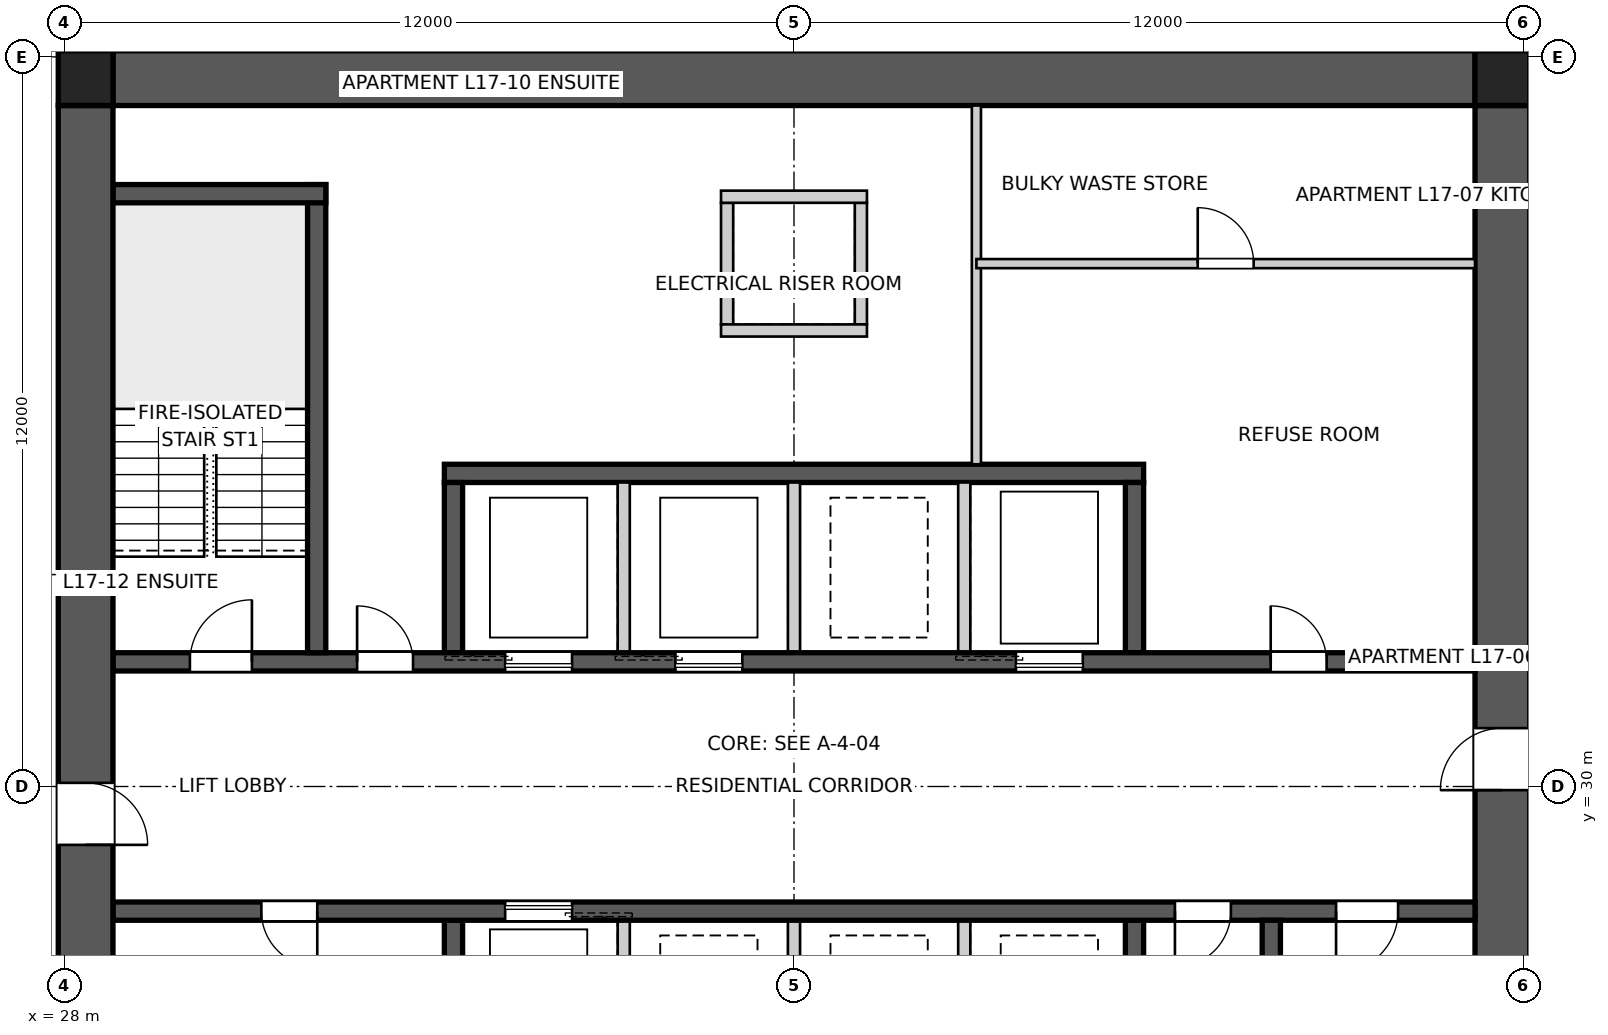
"""IFC4 building model, lengths in metres.
Left out: names, types, materials, properties, quantities, classifications, styles, units other than length and angle.
Written with IfcOpenShell. Run it as: python <this file> out.ifc"""

import sys

from ifc_helpers import new_model, si_unit, direction, frame, frame_2d, origin, origin_2d, place, context, subcontext, project, spatial, polyline, rectangle, outline, extrude, element, fill, save


model = new_model("IFC4")
c1 = context("Model", 3, precision=1e-05, world=origin(), true_north=direction((0.0, 1.0)))
c2 = subcontext(c1, "Body", "Model", "MODEL_VIEW")
j1 = project(units=[si_unit("LENGTHUNIT", "METRE"), si_unit("PLANEANGLEUNIT", "RADIAN")], contexts=[c1])
p1 = place(None, origin())
s1 = spatial("IfcSite", under=j1, at=p1, CompositionType="ELEMENT")
p2 = place(p1, origin())
s2 = spatial("IfcBuilding", under=s1, at=p2, CompositionType="ELEMENT")
p3 = place(p2, frame((0.0, 0.0, 64.2)))
s3 = spatial("IfcBuildingStorey", under=s2, at=p3, CompositionType="ELEMENT", Elevation=64.2)
p4 = place(p3, frame((28.8, 41.65, 0.0), z_axis=(0.0, 0.0, 1.0), x_axis=(1.0, 0.0, 0.0)))
e1 = element("IfcWall", 1, at=p4, inside=s3, PredefinedType="SHEAR", context=c2, shape_type="SweptSolid", body=[
    extrude(outline(polyline([(0.0, -0.45), (22.4, -0.45), (22.4, -0.025), (22.85, -0.025), (22.85, 0.025), (22.4, 0.025), (22.4, 0.45), (0.0, 0.45), (0.0, 0.025), (-0.45, 0.025), (-0.45, -0.025), (0.0, -0.025), (0.0, -0.45)])), origin(), (0.0, 0.0, 1.0), 3.4),
])
p5 = place(p3, frame((51.65, 18.8, 0.0), z_axis=(0.0, 0.0, 1.0), x_axis=(0.0, 1.0, 0.0)))
e2 = element("IfcWall", 2, at=p5, inside=s3, PredefinedType="SHEAR", context=c2, shape_type="SweptSolid", body=[
    extrude(outline(polyline([(0.0, -0.45), (22.4, -0.45), (22.4, -0.025), (22.85, -0.025), (22.85, 0.025), (22.4, 0.025), (22.4, 0.45), (0.0, 0.45), (0.0, 0.025), (-0.45, 0.025), (-0.45, -0.025), (0.0, -0.025), (0.0, -0.45)])), origin(), (0.0, 0.0, 1.0), 3.4),
])
p6 = place(p5, frame((11.14, 0.0, 0.0)))
e3 = element("IfcOpeningElement", 3, at=p6, cuts=e2, PredefinedType="OPENING", context=c2, shape_type="SweptSolid", body=[
    extrude(rectangle(XDim=1.02, YDim=2.4, at=frame_2d((0.51, 1.2))), frame((0.0, 0.46, 0.0), z_axis=(0.0, -1.0, 0.0), x_axis=(1.0, 0.0, 0.0)), (0.0, 0.0, 1.0), 0.92),
])
p7 = place(p3, frame((28.35, 41.2, 0.0), z_axis=(0.0, 0.0, 1.0), x_axis=(0.0, -1.0, 0.0)))
e4 = element("IfcWall", 4, at=p7, inside=s3, PredefinedType="SHEAR", context=c2, shape_type="SweptSolid", body=[
    extrude(outline(polyline([(0.0, -0.45), (22.4, -0.45), (22.4, -0.025), (22.85, -0.025), (22.85, 0.025), (22.4, 0.025), (22.4, 0.45), (0.0, 0.45), (0.0, 0.025), (-0.45, 0.025), (-0.45, -0.025), (0.0, -0.025), (0.0, -0.45)])), origin(), (0.0, 0.0, 1.0), 3.4),
])
p8 = place(p7, frame((11.14, 0.0, 0.0)))
e5 = element("IfcOpeningElement", 5, at=p8, cuts=e4, PredefinedType="OPENING", context=c2, shape_type="SweptSolid", body=[
    extrude(rectangle(XDim=1.02, YDim=2.4, at=frame_2d((0.51, 1.2))), frame((0.0, 0.46, 0.0), z_axis=(0.0, -1.0, 0.0), x_axis=(1.0, 0.0, 0.0)), (0.0, 0.0, 1.0), 0.92),
])
p9 = place(p3, frame((28.8, 32.05, 0.0), z_axis=(0.0, 0.0, 1.0), x_axis=(1.0, 0.0, 0.0)))
e6 = element("IfcWall", 6, at=p9, inside=s3, PredefinedType="SHEAR", context=c2, shape_type="SweptSolid", body=[
    extrude(rectangle(XDim=22.4, YDim=0.3, at=frame_2d((11.2, 0.0))), origin(), (0.0, 0.0, 1.0), 3.4),
])
p10 = place(p9, frame((19.04, 0.0, 0.0)))
e7 = element("IfcOpeningElement", 7, at=p10, cuts=e6, PredefinedType="OPENING", context=c2, shape_type="SweptSolid", body=[
    extrude(rectangle(XDim=0.92, YDim=2.1, at=frame_2d((0.46, 1.05))), frame((0.0, 0.16, 0.0), z_axis=(0.0, -1.0, 0.0), x_axis=(1.0, 0.0, 0.0)), (0.0, 0.0, 1.0), 0.32),
])
p11 = place(p9, frame((1.265, 0.0, 0.0)))
e8 = element("IfcOpeningElement", 8, at=p11, cuts=e6, PredefinedType="OPENING", context=c2, shape_type="SweptSolid", body=[
    extrude(rectangle(XDim=1.02, YDim=2.1, at=frame_2d((0.51, 1.05))), frame((0.0, 0.16, 0.0), z_axis=(0.0, -1.0, 0.0), x_axis=(1.0, 0.0, 0.0)), (0.0, 0.0, 1.0), 0.32),
])
p12 = place(p9, frame((4.015, 0.0, 0.0)))
e9 = element("IfcOpeningElement", 9, at=p12, cuts=e6, PredefinedType="OPENING", context=c2, shape_type="SweptSolid", body=[
    extrude(rectangle(XDim=0.92, YDim=2.1, at=frame_2d((0.46, 1.05))), frame((0.0, 0.16, 0.0), z_axis=(0.0, -1.0, 0.0), x_axis=(1.0, 0.0, 0.0)), (0.0, 0.0, 1.0), 0.32),
])
p13 = place(p9, frame((6.45, 0.0, 0.0)))
e10 = element("IfcOpeningElement", 10, at=p13, cuts=e6, PredefinedType="OPENING", context=c2, shape_type="SweptSolid", body=[
    extrude(rectangle(XDim=1.1, YDim=2.1, at=frame_2d((0.55, 1.05))), frame((0.0, 0.16, 0.0), z_axis=(0.0, -1.0, 0.0), x_axis=(1.0, 0.0, 0.0)), (0.0, 0.0, 1.0), 0.32),
])
p14 = place(p9, frame((9.25, 0.0, 0.0)))
e11 = element("IfcOpeningElement", 11, at=p14, cuts=e6, PredefinedType="OPENING", context=c2, shape_type="SweptSolid", body=[
    extrude(rectangle(XDim=1.1, YDim=2.1, at=frame_2d((0.55, 1.05))), frame((0.0, 0.16, 0.0), z_axis=(0.0, -1.0, 0.0), x_axis=(1.0, 0.0, 0.0)), (0.0, 0.0, 1.0), 0.32),
])
p15 = place(p9, frame((14.85, 0.0, 0.0)))
e12 = element("IfcOpeningElement", 12, at=p15, cuts=e6, PredefinedType="OPENING", context=c2, shape_type="SweptSolid", body=[
    extrude(rectangle(XDim=1.1, YDim=2.1, at=frame_2d((0.55, 1.05))), frame((0.0, 0.16, 0.0), z_axis=(0.0, -1.0, 0.0), x_axis=(1.0, 0.0, 0.0)), (0.0, 0.0, 1.0), 0.32),
])
p16 = place(p3, frame((51.2, 27.95, 0.0), z_axis=(0.0, 0.0, 1.0), x_axis=(-1.0, 0.0, 0.0)))
e13 = element("IfcWall", 13, at=p16, inside=s3, PredefinedType="SHEAR", context=c2, shape_type="SweptSolid", body=[
    extrude(rectangle(XDim=22.4, YDim=0.3, at=frame_2d((11.2, 0.0))), origin(), (0.0, 0.0, 1.0), 3.4),
])
p17 = place(p16, frame((19.04, 0.0, 0.0)))
e14 = element("IfcOpeningElement", 14, at=p17, cuts=e13, PredefinedType="OPENING", context=c2, shape_type="SweptSolid", body=[
    extrude(rectangle(XDim=0.92, YDim=2.1, at=frame_2d((0.46, 1.05))), frame((0.0, 0.16, 0.0), z_axis=(0.0, -1.0, 0.0), x_axis=(1.0, 0.0, 0.0)), (0.0, 0.0, 1.0), 0.32),
])
p18 = place(p16, frame((1.265, 0.0, 0.0)))
e15 = element("IfcOpeningElement", 15, at=p18, cuts=e13, PredefinedType="OPENING", context=c2, shape_type="SweptSolid", body=[
    extrude(rectangle(XDim=1.02, YDim=2.1, at=frame_2d((0.51, 1.05))), frame((0.0, 0.16, 0.0), z_axis=(0.0, -1.0, 0.0), x_axis=(1.0, 0.0, 0.0)), (0.0, 0.0, 1.0), 0.32),
])
p19 = place(p16, frame((4.015, 0.0, 0.0)))
e16 = element("IfcOpeningElement", 16, at=p19, cuts=e13, PredefinedType="OPENING", context=c2, shape_type="SweptSolid", body=[
    extrude(rectangle(XDim=0.92, YDim=2.1, at=frame_2d((0.46, 1.05))), frame((0.0, 0.16, 0.0), z_axis=(0.0, -1.0, 0.0), x_axis=(1.0, 0.0, 0.0)), (0.0, 0.0, 1.0), 0.32),
])
p20 = place(p16, frame((14.85, 0.0, 0.0)))
e17 = element("IfcOpeningElement", 17, at=p20, cuts=e13, PredefinedType="OPENING", context=c2, shape_type="SweptSolid", body=[
    extrude(rectangle(XDim=1.1, YDim=2.1, at=frame_2d((0.55, 1.05))), frame((0.0, 0.16, 0.0), z_axis=(0.0, -1.0, 0.0), x_axis=(1.0, 0.0, 0.0)), (0.0, 0.0, 1.0), 0.32),
])
p21 = place(p3, frame((34.25, 35.15, 0.0), z_axis=(0.0, 0.0, 1.0), x_axis=(1.0, 0.0, 0.0)))
e18 = element("IfcWall", 18, at=p21, inside=s3, PredefinedType="SHEAR", context=c2, shape_type="SweptSolid", body=[
    extrude(rectangle(XDim=11.5, YDim=0.3, at=frame_2d((5.75, 0.0))), origin(), (0.0, 0.0, 1.0), 3.4),
])
for number, where, z_axis, x_axis in (
    (19, (34.4, 32.2, 0.0), (0.0, 0.0, 1.0), (0.0, 1.0, 0.0)),
    (20, (45.6, 27.8, 0.0), (0.0, 0.0, 1.0), (0.0, -1.0, 0.0)),
):
    element("IfcWall", number, at=place(p3, frame(where, z_axis=z_axis, x_axis=x_axis)), inside=s3, PredefinedType="SHEAR", context=c2, shape_type="SweptSolid", body=[
        extrude(rectangle(XDim=2.8, YDim=0.3, at=frame_2d((1.4, 0.0))), origin(), (0.0, 0.0, 1.0), 3.4),
    ])
for number, where, z_axis, x_axis in (
    (21, (37.2, 32.2, 0.0), (0.0, 0.0, 1.0), (0.0, 1.0, 0.0)),
    (22, (42.8, 27.8, 0.0), (0.0, 0.0, 1.0), (0.0, -1.0, 0.0)),
    (23, (40.0, 32.2, 0.0), (0.0, 0.0, 1.0), (0.0, 1.0, 0.0)),
    (24, (40.0, 27.8, 0.0), (0.0, 0.0, 1.0), (0.0, -1.0, 0.0)),
    (25, (42.8, 32.2, 0.0), (0.0, 0.0, 1.0), (0.0, 1.0, 0.0)),
    (26, (37.2, 27.8, 0.0), (0.0, 0.0, 1.0), (0.0, -1.0, 0.0)),
):
    element("IfcWall", number, at=place(p3, frame(where, z_axis=z_axis, x_axis=x_axis)), inside=s3, PredefinedType="SOLIDWALL", context=c2, shape_type="SweptSolid", body=[
        extrude(rectangle(XDim=2.8, YDim=0.2, at=frame_2d((1.4, 0.0))), origin(), (0.0, 0.0, 1.0), 3.4),
    ])
for number, where, z_axis, x_axis in (
    (27, (45.6, 32.2, 0.0), (0.0, 0.0, 1.0), (0.0, 1.0, 0.0)),
    (28, (34.4, 27.8, 0.0), (0.0, 0.0, 1.0), (0.0, -1.0, 0.0)),
):
    element("IfcWall", number, at=place(p3, frame(where, z_axis=z_axis, x_axis=x_axis)), inside=s3, PredefinedType="SHEAR", context=c2, shape_type="SweptSolid", body=[
        extrude(rectangle(XDim=2.8, YDim=0.3, at=frame_2d((1.4, 0.0))), origin(), (0.0, 0.0, 1.0), 3.4),
    ])
p22 = place(p3, frame((32.15, 32.2, 0.0), z_axis=(0.0, 0.0, 1.0), x_axis=(0.0, 1.0, 0.0)))
e29 = element("IfcWall", 29, at=p22, inside=s3, PredefinedType="SHEAR", context=c2, shape_type="SweptSolid", body=[
    extrude(rectangle(XDim=7.7, YDim=0.3, at=frame_2d((3.85, 0.0))), origin(), (0.0, 0.0, 1.0), 3.4),
])
p23 = place(p3, frame((28.8, 39.75, 0.0), z_axis=(0.0, 0.0, 1.0), x_axis=(1.0, 0.0, 0.0)))
e30 = element("IfcWall", 30, at=p23, inside=s3, PredefinedType="SHEAR", context=c2, shape_type="SweptSolid", body=[
    extrude(rectangle(XDim=3.5, YDim=0.3, at=frame_2d((1.75, 0.0))), origin(), (0.0, 0.0, 1.0), 3.4),
])
p24 = place(p3, frame((47.85, 27.8, 0.0), z_axis=(0.0, 0.0, 1.0), x_axis=(0.0, -1.0, 0.0)))
e31 = element("IfcWall", 31, at=p24, inside=s3, PredefinedType="SHEAR", context=c2, shape_type="SweptSolid", body=[
    extrude(rectangle(XDim=7.7, YDim=0.3, at=frame_2d((3.85, 0.0))), origin(), (0.0, 0.0, 1.0), 3.4),
])
for number, where, z_axis, x_axis in (
    (32, (38.9, 37.6, 0.0), (0.0, 0.0, 1.0), (0.0, 1.0, 0.0)),
    (33, (41.1, 37.6, 0.0), (0.0, 0.0, 1.0), (0.0, 1.0, 0.0)),
):
    element("IfcWall", number, at=place(p3, frame(where, z_axis=z_axis, x_axis=x_axis)), inside=s3, PredefinedType="SOLIDWALL", context=c2, shape_type="SweptSolid", body=[
        extrude(rectangle(XDim=2.0, YDim=0.2, at=frame_2d((1.0, 0.0))), origin(), (0.0, 0.0, 1.0), 3.4),
    ])
for number, where, z_axis, x_axis in (
    (34, (38.8, 37.5, 0.0), (0.0, 0.0, 1.0), (1.0, 0.0, 0.0)),
    (35, (38.8, 39.7, 0.0), (0.0, 0.0, 1.0), (1.0, 0.0, 0.0)),
):
    element("IfcWall", number, at=place(p3, frame(where, z_axis=z_axis, x_axis=x_axis)), inside=s3, PredefinedType="SOLIDWALL", context=c2, shape_type="SweptSolid", body=[
        extrude(rectangle(XDim=2.4, YDim=0.2, at=frame_2d((1.2, 0.0))), origin(), (0.0, 0.0, 1.0), 3.4),
    ])
for number, where, z_axis, x_axis in (
    (36, (51.65, 41.65, 0.0), (0.0, 0.0, 1.0), (1.0, 0.0, 0.0)),
    (37, (28.35, 41.65, 0.0), (0.0, 0.0, 1.0), (1.0, 0.0, 0.0)),
):
    element("IfcColumn", number, at=place(p3, frame(where, z_axis=z_axis, x_axis=x_axis)), inside=s3, PredefinedType="COLUMN", context=c2, shape_type="SweptSolid", body=[
        extrude(rectangle(XDim=0.9, YDim=0.9, at=origin_2d()), origin(), (0.0, 0.0, 1.0), 3.4),
    ])
p25 = place(p3, frame((43.0, 41.2, 0.0), z_axis=(0.0, 0.0, 1.0), x_axis=(0.0, -1.0, 0.0)))
e38 = element("IfcWall", 38, at=p25, inside=s3, PredefinedType="SOLIDWALL", context=c2, shape_type="SweptSolid", body=[
    extrude(rectangle(XDim=5.9, YDim=0.15, at=frame_2d((2.95, 0.0))), origin(), (0.0, 0.0, 1.0), 3.25),
])
p26 = place(p3, frame((43.0, 38.6, 0.0), z_axis=(0.0, 0.0, 1.0), x_axis=(1.0, 0.0, 0.0)))
e39 = element("IfcWall", 39, at=p26, inside=s3, PredefinedType="SOLIDWALL", context=c2, shape_type="SweptSolid", body=[
    extrude(rectangle(XDim=8.2, YDim=0.15, at=frame_2d((4.1, 0.0))), origin(), (0.0, 0.0, 1.0), 3.25),
])
p27 = place(p26, frame((3.64, 0.0, 0.0)))
e40 = element("IfcOpeningElement", 40, at=p27, cuts=e39, PredefinedType="OPENING", context=c2, shape_type="SweptSolid", body=[
    extrude(rectangle(XDim=0.92, YDim=2.1, at=frame_2d((0.46, 1.05))), frame((0.0, 0.085, 0.0), z_axis=(0.0, -1.0, 0.0), x_axis=(1.0, 0.0, 0.0)), (0.0, 0.0, 1.0), 0.17),
])
p28 = place(p10, origin())
e41 = element("IfcDoor", 41, at=p28, inside=s3, OperationType="SINGLE_SWING_LEFT", PredefinedType="DOOR", context=c2, shape_type="SweptSolid", body=[
    extrude(rectangle(XDim=0.92, YDim=2.1, at=frame_2d((0.46, 1.05))), frame((0.0, 0.025, 0.0), z_axis=(0.0, -1.0, 0.0), x_axis=(1.0, 0.0, 0.0)), (0.0, 0.0, 1.0), 0.05),
])
fill(e7, e41)
p29 = place(p17, origin())
e42 = element("IfcDoor", 42, at=p29, inside=s3, OperationType="SINGLE_SWING_LEFT", PredefinedType="DOOR", context=c2, shape_type="SweptSolid", body=[
    extrude(rectangle(XDim=0.92, YDim=2.1, at=frame_2d((0.46, 1.05))), frame((0.0, 0.025, 0.0), z_axis=(0.0, -1.0, 0.0), x_axis=(1.0, 0.0, 0.0)), (0.0, 0.0, 1.0), 0.05),
])
fill(e14, e42)
p30 = place(p18, origin())
e43 = element("IfcDoor", 43, at=p30, inside=s3, OperationType="SINGLE_SWING_RIGHT", PredefinedType="DOOR", context=c2, shape_type="SweptSolid", body=[
    extrude(rectangle(XDim=1.02, YDim=2.1, at=frame_2d((0.51, 1.05))), frame((0.0, 0.025, 0.0), z_axis=(0.0, -1.0, 0.0), x_axis=(1.0, 0.0, 0.0)), (0.0, 0.0, 1.0), 0.05),
])
fill(e15, e43)
p31 = place(p11, origin())
e44 = element("IfcDoor", 44, at=p31, inside=s3, OperationType="SINGLE_SWING_RIGHT", PredefinedType="DOOR", context=c2, shape_type="SweptSolid", body=[
    extrude(rectangle(XDim=1.02, YDim=2.1, at=frame_2d((0.51, 1.05))), frame((0.0, 0.025, 0.0), z_axis=(0.0, -1.0, 0.0), x_axis=(1.0, 0.0, 0.0)), (0.0, 0.0, 1.0), 0.05),
])
fill(e8, e44)
p32 = place(p12, origin())
e45 = element("IfcDoor", 45, at=p32, inside=s3, OperationType="SINGLE_SWING_LEFT", PredefinedType="DOOR", context=c2, shape_type="SweptSolid", body=[
    extrude(rectangle(XDim=0.92, YDim=2.1, at=frame_2d((0.46, 1.05))), frame((0.0, 0.025, 0.0), z_axis=(0.0, -1.0, 0.0), x_axis=(1.0, 0.0, 0.0)), (0.0, 0.0, 1.0), 0.05),
])
fill(e9, e45)
p33 = place(p19, origin())
e46 = element("IfcDoor", 46, at=p33, inside=s3, OperationType="SINGLE_SWING_RIGHT", PredefinedType="DOOR", context=c2, shape_type="SweptSolid", body=[
    extrude(rectangle(XDim=0.92, YDim=2.1, at=frame_2d((0.46, 1.05))), frame((0.0, 0.025, 0.0), z_axis=(0.0, -1.0, 0.0), x_axis=(1.0, 0.0, 0.0)), (0.0, 0.0, 1.0), 0.05),
])
fill(e16, e46)
p34 = place(p27, origin())
e47 = element("IfcDoor", 47, at=p34, inside=s3, OperationType="SINGLE_SWING_LEFT", PredefinedType="DOOR", context=c2, shape_type="SweptSolid", body=[
    extrude(rectangle(XDim=0.92, YDim=2.1, at=frame_2d((0.46, 1.05))), frame((0.0, 0.025, 0.0), z_axis=(0.0, -1.0, 0.0), x_axis=(1.0, 0.0, 0.0)), (0.0, 0.0, 1.0), 0.05),
])
fill(e40, e47)
p35 = place(p6, origin())
e48 = element("IfcDoor", 48, at=p35, inside=s3, OperationType="SINGLE_SWING_LEFT", PredefinedType="DOOR", context=c2, shape_type="SweptSolid", body=[
    extrude(rectangle(XDim=1.02, YDim=2.4, at=frame_2d((0.51, 1.2))), frame((0.0, 0.025, 0.0), z_axis=(0.0, -1.0, 0.0), x_axis=(1.0, 0.0, 0.0)), (0.0, 0.0, 1.0), 0.05),
])
fill(e3, e48)
p36 = place(p8, origin())
e49 = element("IfcDoor", 49, at=p36, inside=s3, OperationType="SINGLE_SWING_RIGHT", PredefinedType="DOOR", context=c2, shape_type="SweptSolid", body=[
    extrude(rectangle(XDim=1.02, YDim=2.4, at=frame_2d((0.51, 1.2))), frame((0.0, 0.025, 0.0), z_axis=(0.0, -1.0, 0.0), x_axis=(1.0, 0.0, 0.0)), (0.0, 0.0, 1.0), 0.05),
])
fill(e5, e49)
p37 = place(p13, origin())
e50 = element("IfcDoor", 50, at=p37, inside=s3, OperationType="SLIDING_TO_LEFT", PredefinedType="DOOR", context=c2, shape_type="SweptSolid", body=[
    extrude(rectangle(XDim=1.1, YDim=2.1, at=frame_2d((0.55, 1.05))), frame((0.0, 0.025, 0.0), z_axis=(0.0, -1.0, 0.0), x_axis=(1.0, 0.0, 0.0)), (0.0, 0.0, 1.0), 0.05),
])
fill(e10, e50)
p38 = place(p14, origin())
e51 = element("IfcDoor", 51, at=p38, inside=s3, OperationType="SLIDING_TO_LEFT", PredefinedType="DOOR", context=c2, shape_type="SweptSolid", body=[
    extrude(rectangle(XDim=1.1, YDim=2.1, at=frame_2d((0.55, 1.05))), frame((0.0, 0.025, 0.0), z_axis=(0.0, -1.0, 0.0), x_axis=(1.0, 0.0, 0.0)), (0.0, 0.0, 1.0), 0.05),
])
fill(e11, e51)
p39 = place(p15, origin())
e52 = element("IfcDoor", 52, at=p39, inside=s3, OperationType="SLIDING_TO_LEFT", PredefinedType="DOOR", context=c2, shape_type="SweptSolid", body=[
    extrude(rectangle(XDim=1.1, YDim=2.1, at=frame_2d((0.55, 1.05))), frame((0.0, 0.025, 0.0), z_axis=(0.0, -1.0, 0.0), x_axis=(1.0, 0.0, 0.0)), (0.0, 0.0, 1.0), 0.05),
])
fill(e12, e52)
p40 = place(p20, origin())
e53 = element("IfcDoor", 53, at=p40, inside=s3, OperationType="SLIDING_TO_LEFT", PredefinedType="DOOR", context=c2, shape_type="SweptSolid", body=[
    extrude(rectangle(XDim=1.1, YDim=2.1, at=frame_2d((0.55, 1.05))), frame((0.0, 0.025, 0.0), z_axis=(0.0, -1.0, 0.0), x_axis=(1.0, 0.0, 0.0)), (0.0, 0.0, 1.0), 0.05),
])
fill(e17, e53)
save(model, sys.argv[1])
